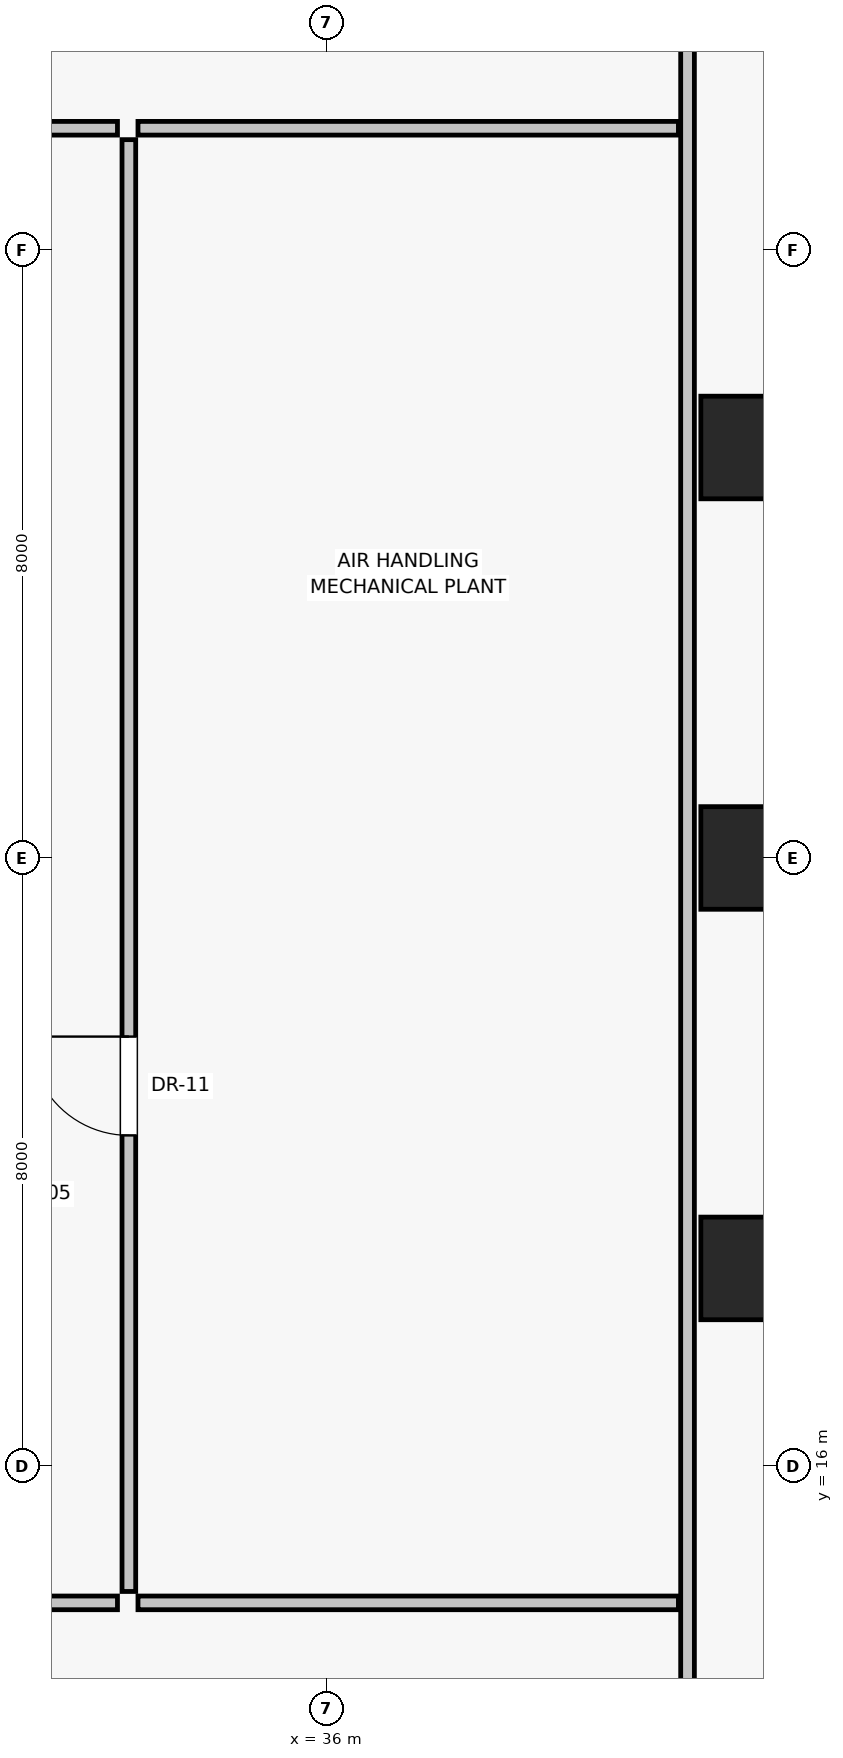
"""IFC4 building model, lengths in metres.
Left out: names, types, materials, properties, quantities, classifications, styles, units other than length and angle.
Written with IfcOpenShell. Run it as: python <this file> out.ifc"""

import sys

from ifc_helpers import new_model, si_unit, direction, frame, frame_2d, origin, origin_2d, place, context, subcontext, project, spatial, rectangle, extrude, source, transform, mapped, element, fill, save


model = new_model("IFC4")
c1 = context("Model", 3, precision=1e-05, world=origin(), true_north=direction((0.0, 1.0)))
c2 = subcontext(c1, "Body", "Model", "MODEL_VIEW")
j1 = project(units=[si_unit("LENGTHUNIT", "METRE"), si_unit("PLANEANGLEUNIT", "RADIAN")], contexts=[c1])
p1 = place(None, origin())
s1 = spatial("IfcSite", under=j1, at=p1, CompositionType="ELEMENT")
p2 = place(p1, origin())
s2 = spatial("IfcBuilding", under=s1, at=p2, CompositionType="ELEMENT")
p3 = place(p2, frame((0.0, 0.0, 80.35)))
s3 = spatial("IfcBuildingStorey", under=s2, at=p3, CompositionType="ELEMENT", Elevation=80.35)
for number, where, z_axis, x_axis in (
    (1, (41.6, 18.6, 0.0), (0.0, 0.0, 1.0), (1.0, 0.0, 0.0)),
    (2, (41.6, 24.0, 0.0), (0.0, 0.0, 1.0), (1.0, 0.0, 0.0)),
    (3, (41.6, 29.4, 0.0), (0.0, 0.0, 1.0), (1.0, 0.0, 0.0)),
):
    element("IfcColumn", number, at=place(p3, frame(where, z_axis=z_axis, x_axis=x_axis)), inside=s3, PredefinedType="COLUMN", context=c2, shape_type="SweptSolid", body=[
        extrude(rectangle(XDim=1.35, YDim=1.35, at=origin_2d()), origin(), (0.0, 0.0, 1.0), 4.8),
    ])
p4 = place(p3, frame((14.75, 14.2, 0.0), z_axis=(0.0, 0.0, 1.0), x_axis=(1.0, 0.0, 0.0)))
e4 = element("IfcWall", 4, at=p4, inside=s3, PredefinedType="PARTITIONING", context=c2, shape_type="SweptSolid", body=[
    extrude(rectangle(XDim=18.5, YDim=0.18, at=frame_2d((9.25, 0.0))), origin(), (0.0, 0.0, 1.0), 4.48),
])
p5 = place(p4, frame((6.0, 0.0, 0.0)))
e5 = element("IfcOpeningElement", 5, at=p5, cuts=e4, PredefinedType="OPENING", context=c2, shape_type="SweptSolid", body=[
    extrude(rectangle(XDim=1.1, YDim=2.03, at=frame_2d((0.55, 1.015))), frame((0.0, 0.1, 0.0), z_axis=(0.0, -1.0, 0.0), x_axis=(1.0, 0.0, 0.0)), (0.0, 0.0, 1.0), 0.2),
])
p6 = place(p3, frame((33.4, 14.35, 0.0), z_axis=(0.0, 0.0, 1.0), x_axis=(0.0, 1.0, 0.0)))
e6 = element("IfcWall", 6, at=p6, inside=s3, PredefinedType="PARTITIONING", context=c2, shape_type="SweptSolid", body=[
    extrude(rectangle(XDim=19.1, YDim=0.18, at=frame_2d((9.55, 0.0))), origin(), (0.0, 0.0, 1.0), 4.48),
])
p7 = place(p6, frame((6.0, 0.0, 0.0)))
e7 = element("IfcOpeningElement", 7, at=p7, cuts=e6, PredefinedType="OPENING", context=c2, shape_type="SweptSolid", body=[
    extrude(rectangle(XDim=1.3, YDim=2.3, at=frame_2d((0.65, 1.15))), frame((0.0, 0.1, 0.0), z_axis=(0.0, -1.0, 0.0), x_axis=(1.0, 0.0, 0.0)), (0.0, 0.0, 1.0), 0.2),
])
p8 = place(p3, frame((14.75, 33.6, 0.0), z_axis=(0.0, 0.0, 1.0), x_axis=(1.0, 0.0, 0.0)))
e8 = element("IfcWall", 8, at=p8, inside=s3, PredefinedType="PARTITIONING", context=c2, shape_type="SweptSolid", body=[
    extrude(rectangle(XDim=18.5, YDim=0.18, at=frame_2d((9.25, 0.0))), origin(), (0.0, 0.0, 1.0), 4.48),
])
p9 = place(p8, frame((6.0, 0.0, 0.0)))
e9 = element("IfcOpeningElement", 9, at=p9, cuts=e8, PredefinedType="OPENING", context=c2, shape_type="SweptSolid", body=[
    extrude(rectangle(XDim=1.1, YDim=2.03, at=frame_2d((0.55, 1.015))), frame((0.0, 0.1, 0.0), z_axis=(0.0, -1.0, 0.0), x_axis=(1.0, 0.0, 0.0)), (0.0, 0.0, 1.0), 0.2),
])
p10 = place(p3, frame((40.75, 7.37, 0.0), z_axis=(0.0, 0.0, 1.0), x_axis=(0.0, 1.0, 0.0)))
e10 = element("IfcWall", 10, at=p10, inside=s3, PredefinedType="PARTITIONING", context=c2, shape_type="SweptSolid", body=[
    extrude(rectangle(XDim=33.26, YDim=0.18, at=frame_2d((16.63, 0.0))), origin(), (0.0, 0.0, 1.0), 2.28),
])
for number, where, z_axis, x_axis in (
    (11, (33.52, 14.2, 0.0), (0.0, 0.0, 1.0), (1.0, 0.0, 0.0)),
    (12, (33.52, 33.6, 0.0), (0.0, 0.0, 1.0), (1.0, 0.0, 0.0)),
):
    element("IfcWall", number, at=place(p3, frame(where, z_axis=z_axis, x_axis=x_axis)), inside=s3, PredefinedType="PARTITIONING", context=c2, shape_type="SweptSolid", body=[
        extrude(rectangle(XDim=7.11, YDim=0.18, at=frame_2d((3.555, 0.0))), origin(), (0.0, 0.0, 1.0), 4.48),
    ])
m1 = source(origin(), c2, "Body", "SweptSolid", [
    extrude(rectangle(XDim=1.3, YDim=2.3, at=frame_2d((0.65, 1.15))), frame((0.0, 0.025, 0.0), z_axis=(0.0, -1.0, 0.0), x_axis=(1.0, 0.0, 0.0)), (0.0, 0.0, 1.0), 0.05),
])
p11 = place(p7, origin())
e13 = element("IfcDoor", 13, at=p11, inside=s3, OperationType="SINGLE_SWING_RIGHT", PredefinedType="DOOR", context=c2, shape_type="MappedRepresentation", body=[
    mapped(m1, transform((0.0, 0.0, 0.0), scale=1.0)),
])
fill(e7, e13)
save(model, sys.argv[1])
